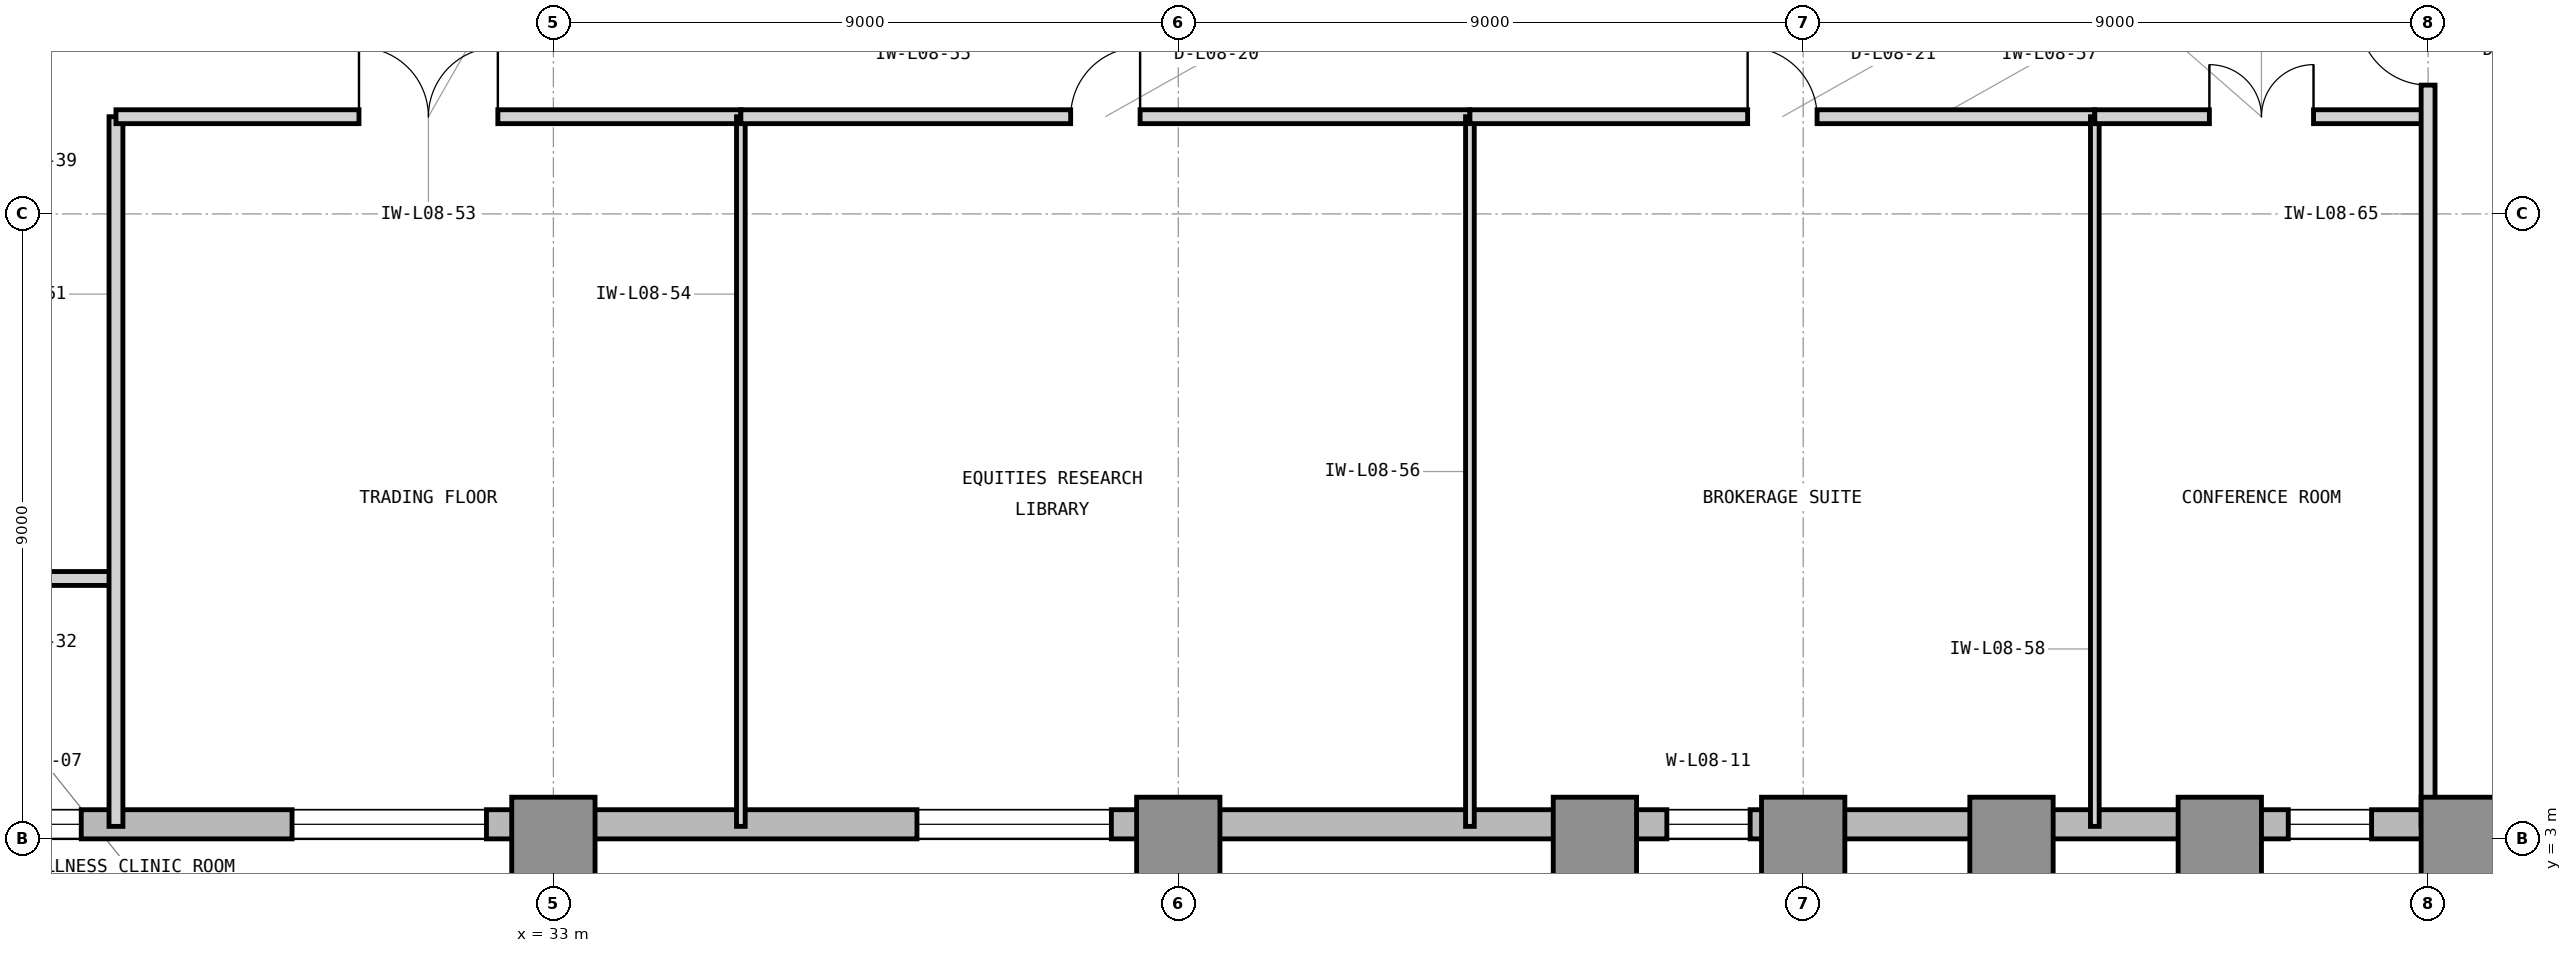
"""IFC4 building model, lengths in metres.
Left out: names, types, materials, properties, quantities, classifications, styles, units other than length and angle.
Written with IfcOpenShell. Run it as: python <this file> out.ifc"""

import sys

from ifc_helpers import new_model, si_unit, direction, frame, frame_2d, origin, origin_2d, place, context, subcontext, project, spatial, rectangle, extrude, element, fill, save


model = new_model("IFC4")
c1 = context("Model", 3, precision=1e-05, world=origin(), true_north=direction((0.0, 1.0)))
c2 = subcontext(c1, "Body", "Model", "MODEL_VIEW")
j1 = project(units=[si_unit("LENGTHUNIT", "METRE"), si_unit("PLANEANGLEUNIT", "RADIAN")], contexts=[c1])
p1 = place(None, origin())
s1 = spatial("IfcSite", under=j1, at=p1, CompositionType="ELEMENT")
p2 = place(p1, origin())
s2 = spatial("IfcBuilding", under=s1, at=p2, CompositionType="ELEMENT")
p3 = place(p2, frame((0.0, 0.0, 38.4)))
s3 = spatial("IfcBuildingStorey", under=s2, at=p3, CompositionType="ELEMENT", Elevation=38.4)
for number, where, z_axis, x_axis in (
    (1, (33.0, 3.0, 0.0), (0.0, 0.0, 1.0), (1.0, 0.0, 0.0)),
    (2, (42.0, 3.0, 0.0), (0.0, 0.0, 1.0), (1.0, 0.0, 0.0)),
    (3, (48.0, 3.0, 0.0), (0.0, 0.0, 1.0), (1.0, 0.0, 0.0)),
    (4, (51.0, 3.0, 0.0), (0.0, 0.0, 1.0), (1.0, 0.0, 0.0)),
    (5, (54.0, 3.0, 0.0), (0.0, 0.0, 1.0), (1.0, 0.0, 0.0)),
    (6, (57.0, 3.0, 0.0), (0.0, 0.0, 1.0), (1.0, 0.0, 0.0)),
    (7, (60.5, 3.0, 0.0), (0.0, 0.0, 1.0), (1.0, 0.0, 0.0)),
):
    element("IfcColumn", number, at=place(p3, frame(where, z_axis=z_axis, x_axis=x_axis)), inside=s3, PredefinedType="COLUMN", context=c2, shape_type="SweptSolid", body=[
        extrude(rectangle(XDim=1.2, YDim=1.2, at=origin_2d()), origin(), (0.0, 0.0, 1.0), 4.2),
    ])
p4 = place(p3, frame((23.9, 3.21, 0.0), z_axis=(0.0, 0.0, 1.0), x_axis=(1.0, 0.0, 0.0)))
e8 = element("IfcWall", 8, at=p4, inside=s3, PredefinedType="STANDARD", context=c2, shape_type="SweptSolid", body=[
    extrude(rectangle(XDim=40.5, YDim=0.42, at=frame_2d((20.25, 0.0))), origin(), (0.0, 0.0, 1.0), 3.98),
])
p5 = place(p4, frame((1.1, 0.0, 0.85)))
e9 = element("IfcOpeningElement", 9, at=p5, cuts=e8, PredefinedType="OPENING", context=c2, shape_type="SweptSolid", body=[
    extrude(rectangle(XDim=1.2, YDim=2.45, at=frame_2d((0.6, 1.225))), frame((0.0, 0.22, 0.0), z_axis=(0.0, -1.0, 0.0), x_axis=(1.0, 0.0, 0.0)), (0.0, 0.0, 1.0), 0.44),
])
p6 = place(p4, frame((5.336, 0.0, 0.85)))
e10 = element("IfcOpeningElement", 10, at=p6, cuts=e8, PredefinedType="OPENING", context=c2, shape_type="SweptSolid", body=[
    extrude(rectangle(XDim=2.8, YDim=2.45, at=frame_2d((1.4, 1.225))), frame((0.0, 0.22, 0.0), z_axis=(0.0, -1.0, 0.0), x_axis=(1.0, 0.0, 0.0)), (0.0, 0.0, 1.0), 0.44),
])
p7 = place(p4, frame((14.336, 0.0, 0.85)))
e11 = element("IfcOpeningElement", 11, at=p7, cuts=e8, PredefinedType="OPENING", context=c2, shape_type="SweptSolid", body=[
    extrude(rectangle(XDim=2.8, YDim=2.45, at=frame_2d((1.4, 1.225))), frame((0.0, 0.22, 0.0), z_axis=(0.0, -1.0, 0.0), x_axis=(1.0, 0.0, 0.0)), (0.0, 0.0, 1.0), 0.44),
])
p8 = place(p4, frame((25.136, 0.0, 0.85)))
e12 = element("IfcOpeningElement", 12, at=p8, cuts=e8, PredefinedType="OPENING", context=c2, shape_type="SweptSolid", body=[
    extrude(rectangle(XDim=1.2, YDim=2.45, at=frame_2d((0.6, 1.225))), frame((0.0, 0.22, 0.0), z_axis=(0.0, -1.0, 0.0), x_axis=(1.0, 0.0, 0.0)), (0.0, 0.0, 1.0), 0.44),
])
p9 = place(p4, frame((34.086, 0.0, 0.85)))
e13 = element("IfcOpeningElement", 13, at=p9, cuts=e8, PredefinedType="OPENING", context=c2, shape_type="SweptSolid", body=[
    extrude(rectangle(XDim=1.2, YDim=2.45, at=frame_2d((0.6, 1.225))), frame((0.0, 0.22, 0.0), z_axis=(0.0, -1.0, 0.0), x_axis=(1.0, 0.0, 0.0)), (0.0, 0.0, 1.0), 0.44),
])
p10 = place(p3, frame((23.85, 6.75, 0.0), z_axis=(0.0, 0.0, 1.0), x_axis=(1.0, 0.0, 0.0)))
e14 = element("IfcWall", 14, at=p10, inside=s3, PredefinedType="PARTITIONING", context=c2, shape_type="SweptSolid", body=[
    extrude(rectangle(XDim=2.85, YDim=0.2, at=frame_2d((1.425, 0.0))), origin(), (0.0, 0.0, 1.0), 3.97),
])
p11 = place(p10, frame((0.7, 0.0, 0.0)))
e15 = element("IfcOpeningElement", 15, at=p11, cuts=e14, PredefinedType="OPENING", context=c2, shape_type="SweptSolid", body=[
    extrude(rectangle(XDim=1.0, YDim=2.15, at=frame_2d((0.5, 1.075))), frame((0.0, 0.11, 0.0), z_axis=(0.0, -1.0, 0.0), x_axis=(1.0, 0.0, 0.0)), (0.0, 0.0, 1.0), 0.22),
])
p12 = place(p3, frame((26.7, 3.18, 0.0), z_axis=(0.0, 0.0, 1.0), x_axis=(0.0, 1.0, 0.0)))
e16 = element("IfcWall", 16, at=p12, inside=s3, PredefinedType="PARTITIONING", context=c2, shape_type="SweptSolid", body=[
    extrude(rectangle(XDim=10.22, YDim=0.2, at=frame_2d((5.11, 0.0))), origin(), (0.0, 0.0, 1.0), 3.97),
])
p13 = place(p3, frame((26.7, 13.4, 0.0), z_axis=(0.0, 0.0, 1.0), x_axis=(1.0, 0.0, 0.0)))
e17 = element("IfcWall", 17, at=p13, inside=s3, PredefinedType="PARTITIONING", context=c2, shape_type="SweptSolid", body=[
    extrude(rectangle(XDim=9.0, YDim=0.2, at=frame_2d((4.5, 0.0))), origin(), (0.0, 0.0, 1.0), 3.97),
])
p14 = place(p13, frame((3.5, 0.0, 0.0)))
e18 = element("IfcOpeningElement", 18, at=p14, cuts=e17, PredefinedType="OPENING", context=c2, shape_type="SweptSolid", body=[
    extrude(rectangle(XDim=2.0, YDim=2.5, at=frame_2d((1.0, 1.25))), frame((0.0, 0.11, 0.0), z_axis=(0.0, -1.0, 0.0), x_axis=(1.0, 0.0, 0.0)), (0.0, 0.0, 1.0), 0.22),
])
p15 = place(p3, frame((35.7, 3.18, 0.0), z_axis=(0.0, 0.0, 1.0), x_axis=(0.0, 1.0, 0.0)))
e19 = element("IfcWall", 19, at=p15, inside=s3, PredefinedType="PARTITIONING", context=c2, shape_type="SweptSolid", body=[
    extrude(rectangle(XDim=10.22, YDim=0.125, at=frame_2d((5.11, 0.0))), origin(), (0.0, 0.0, 1.0), 3.97),
])
p16 = place(p3, frame((35.7, 13.4, 0.0), z_axis=(0.0, 0.0, 1.0), x_axis=(1.0, 0.0, 0.0)))
e20 = element("IfcWall", 20, at=p16, inside=s3, PredefinedType="PARTITIONING", context=c2, shape_type="SweptSolid", body=[
    extrude(rectangle(XDim=10.5, YDim=0.2, at=frame_2d((5.25, 0.0))), origin(), (0.0, 0.0, 1.0), 3.97),
])
p17 = place(p16, frame((4.75, 0.0, 0.0)))
e21 = element("IfcOpeningElement", 21, at=p17, cuts=e20, PredefinedType="OPENING", context=c2, shape_type="SweptSolid", body=[
    extrude(rectangle(XDim=1.0, YDim=2.15, at=frame_2d((0.5, 1.075))), frame((0.0, 0.11, 0.0), z_axis=(0.0, -1.0, 0.0), x_axis=(1.0, 0.0, 0.0)), (0.0, 0.0, 1.0), 0.22),
])
p18 = place(p3, frame((46.2, 3.18, 0.0), z_axis=(0.0, 0.0, 1.0), x_axis=(0.0, 1.0, 0.0)))
e22 = element("IfcWall", 22, at=p18, inside=s3, PredefinedType="PARTITIONING", context=c2, shape_type="SweptSolid", body=[
    extrude(rectangle(XDim=10.22, YDim=0.125, at=frame_2d((5.11, 0.0))), origin(), (0.0, 0.0, 1.0), 3.97),
])
p19 = place(p3, frame((46.2, 13.4, 0.0), z_axis=(0.0, 0.0, 1.0), x_axis=(1.0, 0.0, 0.0)))
e23 = element("IfcWall", 23, at=p19, inside=s3, PredefinedType="PARTITIONING", context=c2, shape_type="SweptSolid", body=[
    extrude(rectangle(XDim=9.0, YDim=0.2, at=frame_2d((4.5, 0.0))), origin(), (0.0, 0.0, 1.0), 3.97),
])
p20 = place(p19, frame((4.0, 0.0, 0.0)))
e24 = element("IfcOpeningElement", 24, at=p20, cuts=e23, PredefinedType="OPENING", context=c2, shape_type="SweptSolid", body=[
    extrude(rectangle(XDim=1.0, YDim=2.15, at=frame_2d((0.5, 1.075))), frame((0.0, 0.11, 0.0), z_axis=(0.0, -1.0, 0.0), x_axis=(1.0, 0.0, 0.0)), (0.0, 0.0, 1.0), 0.22),
])
p21 = place(p3, frame((55.2, 3.18, 0.0), z_axis=(0.0, 0.0, 1.0), x_axis=(0.0, 1.0, 0.0)))
e25 = element("IfcWall", 25, at=p21, inside=s3, PredefinedType="PARTITIONING", context=c2, shape_type="SweptSolid", body=[
    extrude(rectangle(XDim=10.22, YDim=0.125, at=frame_2d((5.11, 0.0))), origin(), (0.0, 0.0, 1.0), 3.97),
])
p22 = place(p3, frame((55.2, 13.4, 0.0), z_axis=(0.0, 0.0, 1.0), x_axis=(1.0, 0.0, 0.0)))
e26 = element("IfcWall", 26, at=p22, inside=s3, PredefinedType="PARTITIONING", context=c2, shape_type="SweptSolid", body=[
    extrude(rectangle(XDim=4.8, YDim=0.2, at=frame_2d((2.4, 0.0))), origin(), (0.0, 0.0, 1.0), 3.97),
])
p23 = place(p22, frame((1.65, 0.0, 0.0)))
e27 = element("IfcOpeningElement", 27, at=p23, cuts=e26, PredefinedType="OPENING", context=c2, shape_type="SweptSolid", body=[
    extrude(rectangle(XDim=1.5, YDim=2.3, at=frame_2d((0.75, 1.15))), frame((0.0, 0.11, 0.0), z_axis=(0.0, -1.0, 0.0), x_axis=(1.0, 0.0, 0.0)), (0.0, 0.0, 1.0), 0.22),
])
p24 = place(p3, frame((60.0, 3.18, 0.0), z_axis=(0.0, 0.0, 1.0), x_axis=(0.0, 1.0, 0.0)))
e28 = element("IfcWall", 28, at=p24, inside=s3, PredefinedType="PARTITIONING", context=c2, shape_type="SweptSolid", body=[
    extrude(rectangle(XDim=17.64, YDim=0.2, at=frame_2d((8.82, 0.0))), origin(), (0.0, 0.0, 1.0), 3.97),
])
p25 = place(p24, frame((10.675, 0.0, 0.0)))
e29 = element("IfcOpeningElement", 29, at=p25, cuts=e28, PredefinedType="OPENING", context=c2, shape_type="SweptSolid", body=[
    extrude(rectangle(XDim=1.0, YDim=2.15, at=frame_2d((0.5, 1.075))), frame((0.0, 0.11, 0.0), z_axis=(0.0, -1.0, 0.0), x_axis=(1.0, 0.0, 0.0)), (0.0, 0.0, 1.0), 0.22),
])
p26 = place(p14, origin())
e30 = element("IfcDoor", 30, at=p26, inside=s3, OperationType="DOUBLE_DOOR_SINGLE_SWING", PredefinedType="DOOR", context=c2, shape_type="SweptSolid", body=[
    extrude(rectangle(XDim=2.0, YDim=2.5, at=frame_2d((1.0, 1.25))), frame((0.0, 0.025, 0.0), z_axis=(0.0, -1.0, 0.0), x_axis=(1.0, 0.0, 0.0)), (0.0, 0.0, 1.0), 0.05),
])
fill(e18, e30)
p27 = place(p17, origin())
e31 = element("IfcDoor", 31, at=p27, inside=s3, OperationType="SINGLE_SWING_RIGHT", PredefinedType="DOOR", context=c2, shape_type="SweptSolid", body=[
    extrude(rectangle(XDim=1.0, YDim=2.15, at=frame_2d((0.5, 1.075))), frame((0.0, 0.025, 0.0), z_axis=(0.0, -1.0, 0.0), x_axis=(1.0, 0.0, 0.0)), (0.0, 0.0, 1.0), 0.05),
])
fill(e21, e31)
p28 = place(p20, origin())
e32 = element("IfcDoor", 32, at=p28, inside=s3, OperationType="SINGLE_SWING_LEFT", PredefinedType="DOOR", context=c2, shape_type="SweptSolid", body=[
    extrude(rectangle(XDim=1.0, YDim=2.15, at=frame_2d((0.5, 1.075))), frame((0.0, 0.025, 0.0), z_axis=(0.0, -1.0, 0.0), x_axis=(1.0, 0.0, 0.0)), (0.0, 0.0, 1.0), 0.05),
])
fill(e24, e32)
p29 = place(p23, origin())
e33 = element("IfcDoor", 33, at=p29, inside=s3, OperationType="DOUBLE_DOOR_SINGLE_SWING", PredefinedType="DOOR", context=c2, shape_type="SweptSolid", body=[
    extrude(rectangle(XDim=1.5, YDim=2.3, at=frame_2d((0.75, 1.15))), frame((0.0, 0.025, 0.0), z_axis=(0.0, -1.0, 0.0), x_axis=(1.0, 0.0, 0.0)), (0.0, 0.0, 1.0), 0.05),
])
fill(e27, e33)
p30 = place(p25, origin())
e34 = element("IfcDoor", 34, at=p30, inside=s3, OperationType="SINGLE_SWING_RIGHT", PredefinedType="DOOR", context=c2, shape_type="SweptSolid", body=[
    extrude(rectangle(XDim=1.0, YDim=2.15, at=frame_2d((0.5, 1.075))), frame((0.0, 0.025, 0.0), z_axis=(0.0, -1.0, 0.0), x_axis=(1.0, 0.0, 0.0)), (0.0, 0.0, 1.0), 0.05),
])
fill(e29, e34)
p31 = place(p5, origin())
e35 = element("IfcWindow", 35, at=p31, inside=s3, PartitioningType="SINGLE_PANEL", PredefinedType="WINDOW", context=c2, shape_type="SweptSolid", body=[
    extrude(rectangle(XDim=1.2, YDim=2.45, at=frame_2d((0.6, 1.225))), frame((0.0, 0.11, 0.0), z_axis=(0.0, -1.0, 0.0), x_axis=(1.0, 0.0, 0.0)), (0.0, 0.0, 1.0), 0.06),
])
fill(e9, e35)
p32 = place(p6, origin())
e36 = element("IfcWindow", 36, at=p32, inside=s3, PartitioningType="SINGLE_PANEL", PredefinedType="WINDOW", context=c2, shape_type="SweptSolid", body=[
    extrude(rectangle(XDim=2.8, YDim=2.45, at=frame_2d((1.4, 1.225))), frame((0.0, 0.11, 0.0), z_axis=(0.0, -1.0, 0.0), x_axis=(1.0, 0.0, 0.0)), (0.0, 0.0, 1.0), 0.06),
])
fill(e10, e36)
p33 = place(p7, origin())
e37 = element("IfcWindow", 37, at=p33, inside=s3, PartitioningType="SINGLE_PANEL", PredefinedType="WINDOW", context=c2, shape_type="SweptSolid", body=[
    extrude(rectangle(XDim=2.8, YDim=2.45, at=frame_2d((1.4, 1.225))), frame((0.0, 0.11, 0.0), z_axis=(0.0, -1.0, 0.0), x_axis=(1.0, 0.0, 0.0)), (0.0, 0.0, 1.0), 0.06),
])
fill(e11, e37)
p34 = place(p8, origin())
e38 = element("IfcWindow", 38, at=p34, inside=s3, PartitioningType="SINGLE_PANEL", PredefinedType="WINDOW", context=c2, shape_type="SweptSolid", body=[
    extrude(rectangle(XDim=1.2, YDim=2.45, at=frame_2d((0.6, 1.225))), frame((0.0, 0.11, 0.0), z_axis=(0.0, -1.0, 0.0), x_axis=(1.0, 0.0, 0.0)), (0.0, 0.0, 1.0), 0.06),
])
fill(e12, e38)
p35 = place(p9, origin())
e39 = element("IfcWindow", 39, at=p35, inside=s3, PartitioningType="SINGLE_PANEL", PredefinedType="WINDOW", context=c2, shape_type="SweptSolid", body=[
    extrude(rectangle(XDim=1.2, YDim=2.45, at=frame_2d((0.6, 1.225))), frame((0.0, 0.11, 0.0), z_axis=(0.0, -1.0, 0.0), x_axis=(1.0, 0.0, 0.0)), (0.0, 0.0, 1.0), 0.06),
])
fill(e13, e39)
save(model, sys.argv[1])
